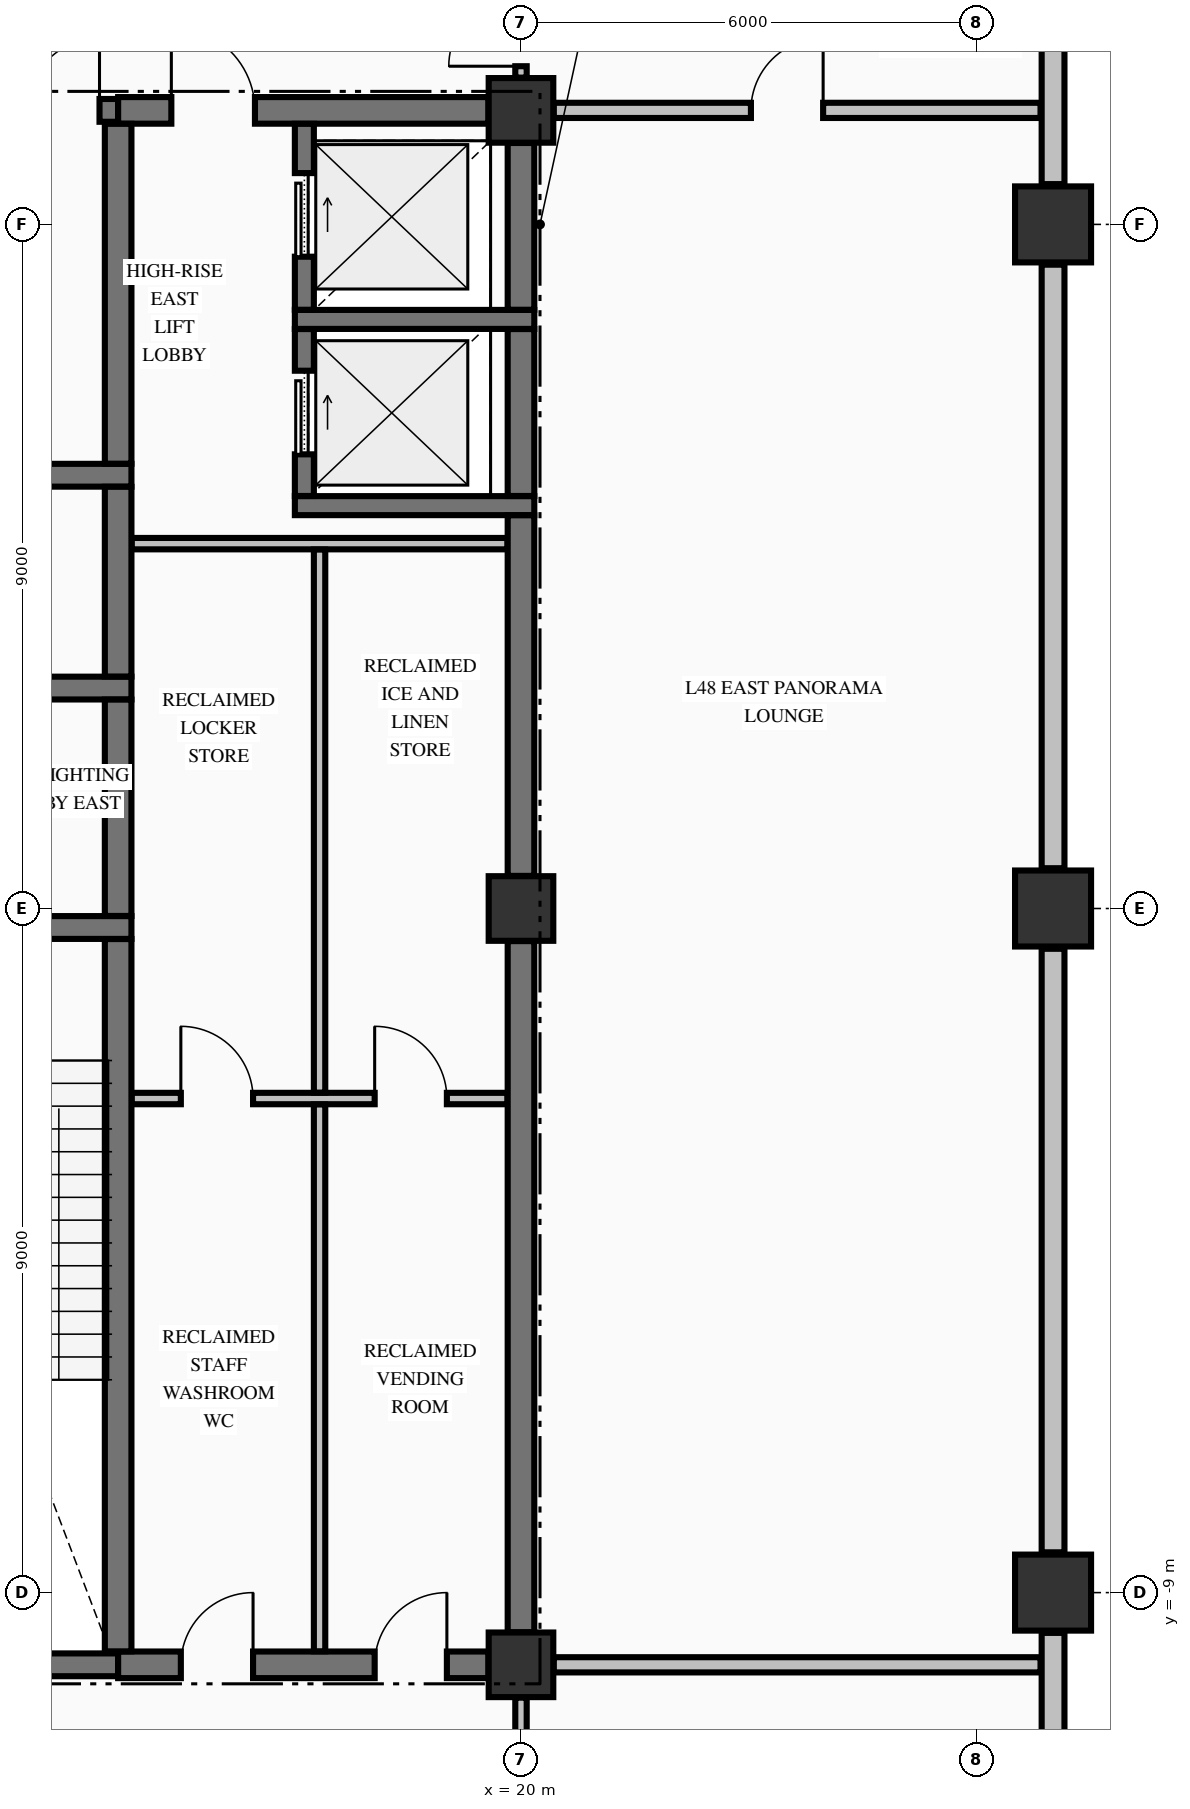
"""IFC4 building model, lengths in metres.
Left out: names, types, materials, properties, quantities, classifications, styles, units other than length and angle.
Written with IfcOpenShell. Run it as: python <this file> out.ifc"""

import sys

from ifc_helpers import new_model, si_unit, direction, frame, frame_2d, origin, origin_2d, place, context, subcontext, project, spatial, rectangle, extrude, element, fill, save


model = new_model("IFC4")
c1 = context("Model", 3, precision=1e-05, world=origin(), true_north=direction((0.0, 1.0)))
c2 = subcontext(c1, "Body", "Model", "MODEL_VIEW")
j1 = project(units=[si_unit("LENGTHUNIT", "METRE"), si_unit("PLANEANGLEUNIT", "RADIAN")], contexts=[c1])
p1 = place(None, origin())
s1 = spatial("IfcSite", under=j1, at=p1, CompositionType="ELEMENT")
p2 = place(p1, origin())
s2 = spatial("IfcBuilding", under=s1, at=p2, CompositionType="ELEMENT")
p3 = place(p2, frame((0.0, 0.0, 186.46)))
s3 = spatial("IfcBuildingStorey", under=s2, at=p3, CompositionType="ELEMENT", Elevation=186.46)
for number, where, z_axis, x_axis in (
    (1, (27.0, -9.0, -0.425), (0.0, 0.0, 1.0), (1.0, 0.0, 0.0)),
    (2, (27.0, 0.0, -0.425), (0.0, 0.0, 1.0), (1.0, 0.0, 0.0)),
    (3, (27.0, 9.0, -0.425), (0.0, 0.0, 1.0), (1.0, 0.0, 0.0)),
):
    element("IfcColumn", number, at=place(p3, frame(where, z_axis=z_axis, x_axis=x_axis)), inside=s3, PredefinedType="COLUMN", context=c2, shape_type="SweptSolid", body=[
        extrude(rectangle(XDim=1.0, YDim=1.0, at=origin_2d()), origin(), (0.0, 0.0, 1.0), 5.0),
    ])
for number, where, z_axis, x_axis in (
    (4, (20.0, -9.95, -0.425), (0.0, 0.0, 1.0), (1.0, 0.0, 0.0)),
    (5, (20.0, 10.5, -0.425), (0.0, 0.0, 1.0), (1.0, 0.0, 0.0)),
    (6, (20.0, 0.0, -0.425), (0.0, 0.0, 1.0), (1.0, 0.0, 0.0)),
):
    element("IfcColumn", number, at=place(p3, frame(where, z_axis=z_axis, x_axis=x_axis)), inside=s3, PredefinedType="COLUMN", context=c2, shape_type="SweptSolid", body=[
        extrude(rectangle(XDim=0.85, YDim=0.85, at=origin_2d()), origin(), (0.0, 0.0, 1.0), 5.0),
    ])
p4 = place(p3, frame((27.0, -18.97, 0.0), z_axis=(0.0, 0.0, 1.0), x_axis=(0.0, 1.0, 0.0)))
e7 = element("IfcWall", 7, at=p4, inside=s3, PredefinedType="STANDARD", context=c2, shape_type="SweptSolid", body=[
    extrude(rectangle(XDim=9.44, YDim=0.3, at=frame_2d((4.72, 0.0))), origin(), (0.0, 0.0, 1.0), 2.167),
])
for number, where, z_axis, x_axis in (
    (8, (27.0, -8.47, 0.0), (0.0, 0.0, 1.0), (0.0, 1.0, 0.0)),
    (9, (27.0, 0.53, 0.0), (0.0, 0.0, 1.0), (0.0, 1.0, 0.0)),
):
    element("IfcWall", number, at=place(p3, frame(where, z_axis=z_axis, x_axis=x_axis)), inside=s3, PredefinedType="STANDARD", context=c2, shape_type="SweptSolid", body=[
        extrude(rectangle(XDim=7.94, YDim=0.3, at=frame_2d((3.97, 0.0))), origin(), (0.0, 0.0, 1.0), 2.167),
    ])
p5 = place(p3, frame((27.0, 9.53, 0.0), z_axis=(0.0, 0.0, 1.0), x_axis=(0.0, 1.0, 0.0)))
e10 = element("IfcWall", 10, at=p5, inside=s3, PredefinedType="STANDARD", context=c2, shape_type="SweptSolid", body=[
    extrude(rectangle(XDim=9.44, YDim=0.3, at=frame_2d((4.72, 0.0))), origin(), (0.0, 0.0, 1.0), 2.167),
])
p6 = place(p3, frame((11.429, -9.95, 0.0), z_axis=(0.0, 0.0, 1.0), x_axis=(1.0, 0.0, 0.0)))
e11 = element("IfcWall", 11, at=p6, inside=s3, PredefinedType="SHEAR", context=c2, shape_type="SweptSolid", body=[
    extrude(rectangle(XDim=3.271, YDim=0.3, at=frame_2d((1.635, 0.0))), origin(), (0.0, 0.0, 1.0), 4.575),
])
p7 = place(p3, frame((14.7, -9.95, 0.0), z_axis=(0.0, 0.0, 1.0), x_axis=(1.0, 0.0, 0.0)))
e12 = element("IfcWall", 12, at=p7, inside=s3, PredefinedType="SHEAR", context=c2, shape_type="SweptSolid", body=[
    extrude(rectangle(XDim=4.871, YDim=0.35, at=frame_2d((2.436, 0.0))), origin(), (0.0, 0.0, 1.0), 4.575),
])
p8 = place(p7, frame((0.825, 0.0, 0.0)))
e13 = element("IfcOpeningElement", 13, at=p8, cuts=e12, PredefinedType="OPENING", context=c2, shape_type="SweptSolid", body=[
    extrude(rectangle(XDim=0.95, YDim=2.15, at=frame_2d((0.475, 1.075))), frame((0.0, 0.185, 0.0), z_axis=(0.0, -1.0, 0.0), x_axis=(1.0, 0.0, 0.0)), (0.0, 0.0, 1.0), 0.37),
])
p9 = place(p7, frame((3.375, 0.0, 0.0)))
e14 = element("IfcOpeningElement", 14, at=p9, cuts=e12, PredefinedType="OPENING", context=c2, shape_type="SweptSolid", body=[
    extrude(rectangle(XDim=0.95, YDim=2.15, at=frame_2d((0.475, 1.075))), frame((0.0, 0.185, 0.0), z_axis=(0.0, -1.0, 0.0), x_axis=(1.0, 0.0, 0.0)), (0.0, 0.0, 1.0), 0.37),
])
p10 = place(p3, frame((11.429, -0.25, 0.0), z_axis=(0.0, 0.0, 1.0), x_axis=(1.0, 0.0, 0.0)))
e15 = element("IfcWall", 15, at=p10, inside=s3, PredefinedType="SHEAR", context=c2, shape_type="SweptSolid", body=[
    extrude(rectangle(XDim=3.446, YDim=0.3, at=frame_2d((1.723, 0.0))), origin(), (0.0, 0.0, 1.0), 4.575),
])
p11 = place(p10, frame((1.171, 0.0, 0.0)))
e16 = element("IfcOpeningElement", 16, at=p11, cuts=e15, PredefinedType="OPENING", context=c2, shape_type="SweptSolid", body=[
    extrude(rectangle(XDim=1.1, YDim=2.15, at=frame_2d((0.55, 1.075))), frame((0.0, 0.16, 0.0), z_axis=(0.0, -1.0, 0.0), x_axis=(1.0, 0.0, 0.0)), (0.0, 0.0, 1.0), 0.32),
])
p12 = place(p3, frame((10.85, 2.9, 0.0), z_axis=(0.0, 0.0, 1.0), x_axis=(1.0, 0.0, 0.0)))
e17 = element("IfcWall", 17, at=p12, inside=s3, PredefinedType="SHEAR", context=c2, shape_type="SweptSolid", body=[
    extrude(rectangle(XDim=4.025, YDim=0.3, at=frame_2d((2.012, 0.0))), origin(), (0.0, 0.0, 1.0), 4.575),
])
p13 = place(p12, frame((0.85, 0.0, 0.0)))
e18 = element("IfcOpeningElement", 18, at=p13, cuts=e17, PredefinedType="OPENING", context=c2, shape_type="SweptSolid", body=[
    extrude(rectangle(XDim=1.1, YDim=2.2, at=frame_2d((0.55, 1.1))), frame((0.0, 0.16, 0.0), z_axis=(0.0, -1.0, 0.0), x_axis=(1.0, 0.0, 0.0)), (0.0, 0.0, 1.0), 0.32),
])
p14 = place(p3, frame((17.025, 5.3, 0.0), z_axis=(0.0, 0.0, 1.0), x_axis=(1.0, 0.0, 0.0)))
e19 = element("IfcWall", 19, at=p14, inside=s3, PredefinedType="SOLIDWALL", context=c2, shape_type="SweptSolid", body=[
    extrude(rectangle(XDim=3.15, YDim=0.25, at=frame_2d((1.575, 0.0))), origin(), (0.0, 0.0, 1.0), 4.575),
])
p15 = place(p3, frame((10.85, 5.7, 0.0), z_axis=(0.0, 0.0, 1.0), x_axis=(1.0, 0.0, 0.0)))
e20 = element("IfcWall", 20, at=p15, inside=s3, PredefinedType="SHEAR", context=c2, shape_type="SweptSolid", body=[
    extrude(rectangle(XDim=4.025, YDim=0.3, at=frame_2d((2.012, 0.0))), origin(), (0.0, 0.0, 1.0), 4.575),
])
p16 = place(p3, frame((17.025, 7.75, 0.0), z_axis=(0.0, 0.0, 1.0), x_axis=(1.0, 0.0, 0.0)))
e21 = element("IfcWall", 21, at=p16, inside=s3, PredefinedType="SOLIDWALL", context=c2, shape_type="SweptSolid", body=[
    extrude(rectangle(XDim=3.15, YDim=0.25, at=frame_2d((1.575, 0.0))), origin(), (0.0, 0.0, 1.0), 4.575),
])
p17 = place(p3, frame((11.429, 10.5, 0.0), z_axis=(0.0, 0.0, 1.0), x_axis=(1.0, 0.0, 0.0)))
e22 = element("IfcWall", 22, at=p17, inside=s3, PredefinedType="SHEAR", context=c2, shape_type="SweptSolid", body=[
    extrude(rectangle(XDim=3.271, YDim=0.3, at=frame_2d((1.635, 0.0))), origin(), (0.0, 0.0, 1.0), 4.575),
])
p18 = place(p17, frame((2.076, 0.0, 0.0)))
e23 = element("IfcOpeningElement", 23, at=p18, cuts=e22, PredefinedType="OPENING", context=c2, shape_type="SweptSolid", body=[
    extrude(rectangle(XDim=0.95, YDim=2.15, at=frame_2d((0.475, 1.075))), frame((0.0, 0.16, 0.0), z_axis=(0.0, -1.0, 0.0), x_axis=(1.0, 0.0, 0.0)), (0.0, 0.0, 1.0), 0.32),
])
p19 = place(p3, frame((14.7, 10.5, 0.0), z_axis=(0.0, 0.0, 1.0), x_axis=(1.0, 0.0, 0.0)))
e24 = element("IfcWall", 24, at=p19, inside=s3, PredefinedType="SHEAR", context=c2, shape_type="SweptSolid", body=[
    extrude(rectangle(XDim=4.871, YDim=0.35, at=frame_2d((2.436, 0.0))), origin(), (0.0, 0.0, 1.0), 4.575),
])
p20 = place(p19, frame((0.7, 0.0, 0.0)))
e25 = element("IfcOpeningElement", 25, at=p20, cuts=e24, PredefinedType="OPENING", context=c2, shape_type="SweptSolid", body=[
    extrude(rectangle(XDim=1.1, YDim=2.15, at=frame_2d((0.55, 1.075))), frame((0.0, 0.185, 0.0), z_axis=(0.0, -1.0, 0.0), x_axis=(1.0, 0.0, 0.0)), (0.0, 0.0, 1.0), 0.37),
])
p21 = place(p3, frame((20.431, -9.95, 0.0), z_axis=(0.0, 0.0, 1.0), x_axis=(1.0, 0.0, 0.0)))
e26 = element("IfcWall", 26, at=p21, inside=s3, PredefinedType="PARTITIONING", context=c2, shape_type="SweptSolid", body=[
    extrude(rectangle(XDim=6.404, YDim=0.2, at=frame_2d((3.202, 0.0))), origin(), (0.0, 0.0, 1.0), 4.575),
])
p22 = place(p3, frame((14.878, -2.5, 0.0), z_axis=(0.0, 0.0, 1.0), x_axis=(1.0, 0.0, 0.0)))
e27 = element("IfcWall", 27, at=p22, inside=s3, PredefinedType="PARTITIONING", context=c2, shape_type="SweptSolid", body=[
    extrude(rectangle(XDim=4.944, YDim=0.15, at=frame_2d((2.472, 0.0))), origin(), (0.0, 0.0, 1.0), 4.575),
])
p23 = place(p22, frame((0.647, 0.0, 0.0)))
e28 = element("IfcOpeningElement", 28, at=p23, cuts=e27, PredefinedType="OPENING", context=c2, shape_type="SweptSolid", body=[
    extrude(rectangle(XDim=0.95, YDim=2.15, at=frame_2d((0.475, 1.075))), frame((0.0, 0.085, 0.0), z_axis=(0.0, -1.0, 0.0), x_axis=(1.0, 0.0, 0.0)), (0.0, 0.0, 1.0), 0.17),
])
p24 = place(p22, frame((3.197, 0.0, 0.0)))
e29 = element("IfcOpeningElement", 29, at=p24, cuts=e27, PredefinedType="OPENING", context=c2, shape_type="SweptSolid", body=[
    extrude(rectangle(XDim=0.95, YDim=2.15, at=frame_2d((0.475, 1.075))), frame((0.0, 0.085, 0.0), z_axis=(0.0, -1.0, 0.0), x_axis=(1.0, 0.0, 0.0)), (0.0, 0.0, 1.0), 0.17),
])
p25 = place(p3, frame((14.878, 4.8, 0.0), z_axis=(0.0, 0.0, 1.0), x_axis=(1.0, 0.0, 0.0)))
e30 = element("IfcWall", 30, at=p25, inside=s3, PredefinedType="PARTITIONING", context=c2, shape_type="SweptSolid", body=[
    extrude(rectangle(XDim=4.944, YDim=0.15, at=frame_2d((2.472, 0.0))), origin(), (0.0, 0.0, 1.0), 4.575),
])
p26 = place(p3, frame((20.431, 10.5, 0.0), z_axis=(0.0, 0.0, 1.0), x_axis=(1.0, 0.0, 0.0)))
e31 = element("IfcWall", 31, at=p26, inside=s3, PredefinedType="PARTITIONING", context=c2, shape_type="SweptSolid", body=[
    extrude(rectangle(XDim=6.404, YDim=0.2, at=frame_2d((3.202, 0.0))), origin(), (0.0, 0.0, 1.0), 4.575),
])
p27 = place(p26, frame((2.594, 0.0, 0.0)))
e32 = element("IfcOpeningElement", 32, at=p27, cuts=e31, PredefinedType="OPENING", context=c2, shape_type="SweptSolid", body=[
    extrude(rectangle(XDim=0.95, YDim=2.15, at=frame_2d((0.475, 1.075))), frame((0.0, 0.11, 0.0), z_axis=(0.0, -1.0, 0.0), x_axis=(1.0, 0.0, 0.0)), (0.0, 0.0, 1.0), 0.22),
])
p28 = place(p3, frame((14.7, -9.773, 0.0), z_axis=(0.0, 0.0, 1.0), x_axis=(0.0, 1.0, 0.0)))
e33 = element("IfcWall", 33, at=p28, inside=s3, PredefinedType="SHEAR", context=c2, shape_type="SweptSolid", body=[
    extrude(rectangle(XDim=9.371, YDim=0.35, at=frame_2d((4.686, 0.0))), origin(), (0.0, 0.0, 1.0), 4.575),
])
p29 = place(p3, frame((14.7, -0.098, 0.0), z_axis=(0.0, 0.0, 1.0), x_axis=(0.0, 1.0, 0.0)))
e34 = element("IfcWall", 34, at=p29, inside=s3, PredefinedType="SHEAR", context=c2, shape_type="SweptSolid", body=[
    extrude(rectangle(XDim=2.846, YDim=0.35, at=frame_2d((1.423, 0.0))), origin(), (0.0, 0.0, 1.0), 4.575),
])
p30 = place(p3, frame((14.7, 3.052, 0.0), z_axis=(0.0, 0.0, 1.0), x_axis=(0.0, 1.0, 0.0)))
e35 = element("IfcWall", 35, at=p30, inside=s3, PredefinedType="SHEAR", context=c2, shape_type="SweptSolid", body=[
    extrude(rectangle(XDim=2.496, YDim=0.35, at=frame_2d((1.248, 0.0))), origin(), (0.0, 0.0, 1.0), 4.575),
])
p31 = place(p3, frame((14.7, 5.852, 0.0), z_axis=(0.0, 0.0, 1.0), x_axis=(0.0, 1.0, 0.0)))
e36 = element("IfcWall", 36, at=p31, inside=s3, PredefinedType="SHEAR", context=c2, shape_type="SweptSolid", body=[
    extrude(rectangle(XDim=4.471, YDim=0.35, at=frame_2d((2.235, 0.0))), origin(), (0.0, 0.0, 1.0), 4.575),
])
p32 = place(p3, frame((17.15, 5.427, 0.0), z_axis=(0.0, 0.0, 1.0), x_axis=(0.0, 1.0, 0.0)))
e37 = element("IfcWall", 37, at=p32, inside=s3, PredefinedType="SOLIDWALL", context=c2, shape_type="SweptSolid", body=[
    extrude(rectangle(XDim=2.196, YDim=0.25, at=frame_2d((1.098, 0.0))), origin(), (0.0, 0.0, 1.0), 4.575),
])
p33 = place(p32, frame((0.548, 0.0, 0.0)))
e38 = element("IfcOpeningElement", 38, at=p33, cuts=e37, PredefinedType="OPENING", context=c2, shape_type="SweptSolid", body=[
    extrude(rectangle(XDim=1.1, YDim=2.2, at=frame_2d((0.55, 1.1))), frame((0.0, 0.135, 0.0), z_axis=(0.0, -1.0, 0.0), x_axis=(1.0, 0.0, 0.0)), (0.0, 0.0, 1.0), 0.27),
])
p34 = place(p3, frame((17.15, 7.877, 0.0), z_axis=(0.0, 0.0, 1.0), x_axis=(0.0, 1.0, 0.0)))
e39 = element("IfcWall", 39, at=p34, inside=s3, PredefinedType="SOLIDWALL", context=c2, shape_type="SweptSolid", body=[
    extrude(rectangle(XDim=2.446, YDim=0.25, at=frame_2d((1.223, 0.0))), origin(), (0.0, 0.0, 1.0), 4.575),
])
p35 = place(p34, frame((0.698, 0.0, 0.0)))
e40 = element("IfcOpeningElement", 40, at=p35, cuts=e39, PredefinedType="OPENING", context=c2, shape_type="SweptSolid", body=[
    extrude(rectangle(XDim=1.1, YDim=2.2, at=frame_2d((0.55, 1.1))), frame((0.0, 0.135, 0.0), z_axis=(0.0, -1.0, 0.0), x_axis=(1.0, 0.0, 0.0)), (0.0, 0.0, 1.0), 0.27),
])
p36 = place(p3, frame((20.0, -9.521, 0.0), z_axis=(0.0, 0.0, 1.0), x_axis=(0.0, 1.0, 0.0)))
e41 = element("IfcWall", 41, at=p36, inside=s3, PredefinedType="SHEAR", context=c2, shape_type="SweptSolid", body=[
    extrude(rectangle(XDim=9.092, YDim=0.35, at=frame_2d((4.546, 0.0))), origin(), (0.0, 0.0, 1.0), 4.575),
])
p37 = place(p3, frame((20.0, 0.429, 0.0), z_axis=(0.0, 0.0, 1.0), x_axis=(0.0, 1.0, 0.0)))
e42 = element("IfcWall", 42, at=p37, inside=s3, PredefinedType="SHEAR", context=c2, shape_type="SweptSolid", body=[
    extrude(rectangle(XDim=4.744, YDim=0.35, at=frame_2d((2.372, 0.0))), origin(), (0.0, 0.0, 1.0), 4.575),
])
p38 = place(p3, frame((20.0, 5.427, 0.0), z_axis=(0.0, 0.0, 1.0), x_axis=(0.0, 1.0, 0.0)))
e43 = element("IfcWall", 43, at=p38, inside=s3, PredefinedType="SHEAR", context=c2, shape_type="SweptSolid", body=[
    extrude(rectangle(XDim=2.196, YDim=0.35, at=frame_2d((1.098, 0.0))), origin(), (0.0, 0.0, 1.0), 4.575),
])
p39 = place(p3, frame((20.0, 7.877, 0.0), z_axis=(0.0, 0.0, 1.0), x_axis=(0.0, 1.0, 0.0)))
e44 = element("IfcWall", 44, at=p39, inside=s3, PredefinedType="SHEAR", context=c2, shape_type="SweptSolid", body=[
    extrude(rectangle(XDim=2.194, YDim=0.35, at=frame_2d((1.097, 0.0))), origin(), (0.0, 0.0, 1.0), 4.575),
])
p40 = place(p3, frame((17.35, -9.772, 0.0), z_axis=(0.0, 0.0, 1.0), x_axis=(0.0, 1.0, 0.0)))
e45 = element("IfcWall", 45, at=p40, inside=s3, PredefinedType="PARTITIONING", context=c2, shape_type="SweptSolid", body=[
    extrude(rectangle(XDim=7.194, YDim=0.15, at=frame_2d((3.597, 0.0))), origin(), (0.0, 0.0, 1.0), 4.575),
])
p41 = place(p3, frame((17.35, -2.422, 0.0), z_axis=(0.0, 0.0, 1.0), x_axis=(0.0, 1.0, 0.0)))
e46 = element("IfcWall", 46, at=p41, inside=s3, PredefinedType="PARTITIONING", context=c2, shape_type="SweptSolid", body=[
    extrude(rectangle(XDim=7.144, YDim=0.15, at=frame_2d((3.572, 0.0))), origin(), (0.0, 0.0, 1.0), 4.575),
])
p42 = place(p3, frame((20.0, -12.097, 0.0), z_axis=(0.0, 0.0, 1.0), x_axis=(0.0, 1.0, 0.0)))
e47 = element("IfcWall", 47, at=p42, inside=s3, PredefinedType="PARTITIONING", context=c2, shape_type="SweptSolid", body=[
    extrude(rectangle(XDim=1.716, YDim=0.15, at=frame_2d((0.858, 0.0))), origin(), (0.0, 0.0, 1.0), 3.767),
])
p43 = place(p3, frame((20.0, 10.931, 0.0), z_axis=(0.0, 0.0, 1.0), x_axis=(0.0, 1.0, 0.0)))
e48 = element("IfcWall", 48, at=p43, inside=s3, PredefinedType="PARTITIONING", context=c2, shape_type="SweptSolid", body=[
    extrude(rectangle(XDim=1.516, YDim=0.15, at=frame_2d((0.758, 0.0))), origin(), (0.0, 0.0, 1.0), 3.767),
])
p44 = place(p43, frame((0.15, 0.0, 0.0)))
e49 = element("IfcOpeningElement", 49, at=p44, cuts=e48, PredefinedType="OPENING", context=c2, shape_type="SweptSolid", body=[
    extrude(rectangle(XDim=0.95, YDim=2.02, at=frame_2d((0.475, 1.01))), frame((0.0, 0.085, 0.0), z_axis=(0.0, -1.0, 0.0), x_axis=(1.0, 0.0, 0.0)), (0.0, 0.0, 1.0), 0.17),
])
p45 = place(p18, origin())
e50 = element("IfcDoor", 50, at=p45, inside=s3, OperationType="SINGLE_SWING_RIGHT", PredefinedType="DOOR", context=c2, shape_type="SweptSolid", body=[
    extrude(rectangle(XDim=0.95, YDim=2.15, at=frame_2d((0.475, 1.075))), frame((0.0, 0.025, 0.0), z_axis=(0.0, -1.0, 0.0), x_axis=(1.0, 0.0, 0.0)), (0.0, 0.0, 1.0), 0.05),
])
fill(e23, e50)
p46 = place(p33, origin())
e51 = element("IfcDoor", 51, at=p46, inside=s3, OperationType="SLIDING_TO_RIGHT", PredefinedType="DOOR", context=c2, shape_type="SweptSolid", body=[
    extrude(rectangle(XDim=1.1, YDim=2.2, at=frame_2d((0.55, 1.1))), frame((0.0, 0.025, 0.0), z_axis=(0.0, -1.0, 0.0), x_axis=(1.0, 0.0, 0.0)), (0.0, 0.0, 1.0), 0.05),
])
fill(e38, e51)
p47 = place(p35, origin())
e52 = element("IfcDoor", 52, at=p47, inside=s3, OperationType="SLIDING_TO_RIGHT", PredefinedType="DOOR", context=c2, shape_type="SweptSolid", body=[
    extrude(rectangle(XDim=1.1, YDim=2.2, at=frame_2d((0.55, 1.1))), frame((0.0, 0.025, 0.0), z_axis=(0.0, -1.0, 0.0), x_axis=(1.0, 0.0, 0.0)), (0.0, 0.0, 1.0), 0.05),
])
fill(e40, e52)
p48 = place(p20, origin())
e53 = element("IfcDoor", 53, at=p48, inside=s3, OperationType="SINGLE_SWING_LEFT", PredefinedType="DOOR", context=c2, shape_type="SweptSolid", body=[
    extrude(rectangle(XDim=1.1, YDim=2.15, at=frame_2d((0.55, 1.075))), frame((0.0, 0.025, 0.0), z_axis=(0.0, -1.0, 0.0), x_axis=(1.0, 0.0, 0.0)), (0.0, 0.0, 1.0), 0.05),
])
fill(e25, e53)
p49 = place(p8, origin())
e54 = element("IfcDoor", 54, at=p49, inside=s3, OperationType="SINGLE_SWING_RIGHT", PredefinedType="DOOR", context=c2, shape_type="SweptSolid", body=[
    extrude(rectangle(XDim=0.95, YDim=2.15, at=frame_2d((0.475, 1.075))), frame((0.0, 0.025, 0.0), z_axis=(0.0, -1.0, 0.0), x_axis=(1.0, 0.0, 0.0)), (0.0, 0.0, 1.0), 0.05),
])
fill(e13, e54)
p50 = place(p23, origin())
e55 = element("IfcDoor", 55, at=p50, inside=s3, OperationType="SINGLE_SWING_LEFT", PredefinedType="DOOR", context=c2, shape_type="SweptSolid", body=[
    extrude(rectangle(XDim=0.95, YDim=2.15, at=frame_2d((0.475, 1.075))), frame((0.0, 0.025, 0.0), z_axis=(0.0, -1.0, 0.0), x_axis=(1.0, 0.0, 0.0)), (0.0, 0.0, 1.0), 0.05),
])
fill(e28, e55)
p51 = place(p9, origin())
e56 = element("IfcDoor", 56, at=p51, inside=s3, OperationType="SINGLE_SWING_RIGHT", PredefinedType="DOOR", context=c2, shape_type="SweptSolid", body=[
    extrude(rectangle(XDim=0.95, YDim=2.15, at=frame_2d((0.475, 1.075))), frame((0.0, 0.025, 0.0), z_axis=(0.0, -1.0, 0.0), x_axis=(1.0, 0.0, 0.0)), (0.0, 0.0, 1.0), 0.05),
])
fill(e14, e56)
p52 = place(p24, origin())
e57 = element("IfcDoor", 57, at=p52, inside=s3, OperationType="SINGLE_SWING_LEFT", PredefinedType="DOOR", context=c2, shape_type="SweptSolid", body=[
    extrude(rectangle(XDim=0.95, YDim=2.15, at=frame_2d((0.475, 1.075))), frame((0.0, 0.025, 0.0), z_axis=(0.0, -1.0, 0.0), x_axis=(1.0, 0.0, 0.0)), (0.0, 0.0, 1.0), 0.05),
])
fill(e29, e57)
p53 = place(p44, origin())
e58 = element("IfcDoor", 58, at=p53, inside=s3, OperationType="SINGLE_SWING_LEFT", PredefinedType="DOOR", context=c2, shape_type="SweptSolid", body=[
    extrude(rectangle(XDim=0.95, YDim=2.02, at=frame_2d((0.475, 1.01))), frame((0.0, 0.025, 0.0), z_axis=(0.0, -1.0, 0.0), x_axis=(1.0, 0.0, 0.0)), (0.0, 0.0, 1.0), 0.05),
])
fill(e49, e58)
p54 = place(p27, origin())
e59 = element("IfcDoor", 59, at=p54, inside=s3, OperationType="SINGLE_SWING_RIGHT", PredefinedType="DOOR", context=c2, shape_type="SweptSolid", body=[
    extrude(rectangle(XDim=0.95, YDim=2.15, at=frame_2d((0.475, 1.075))), frame((0.0, 0.025, 0.0), z_axis=(0.0, -1.0, 0.0), x_axis=(1.0, 0.0, 0.0)), (0.0, 0.0, 1.0), 0.05),
])
fill(e32, e59)
save(model, sys.argv[1])
